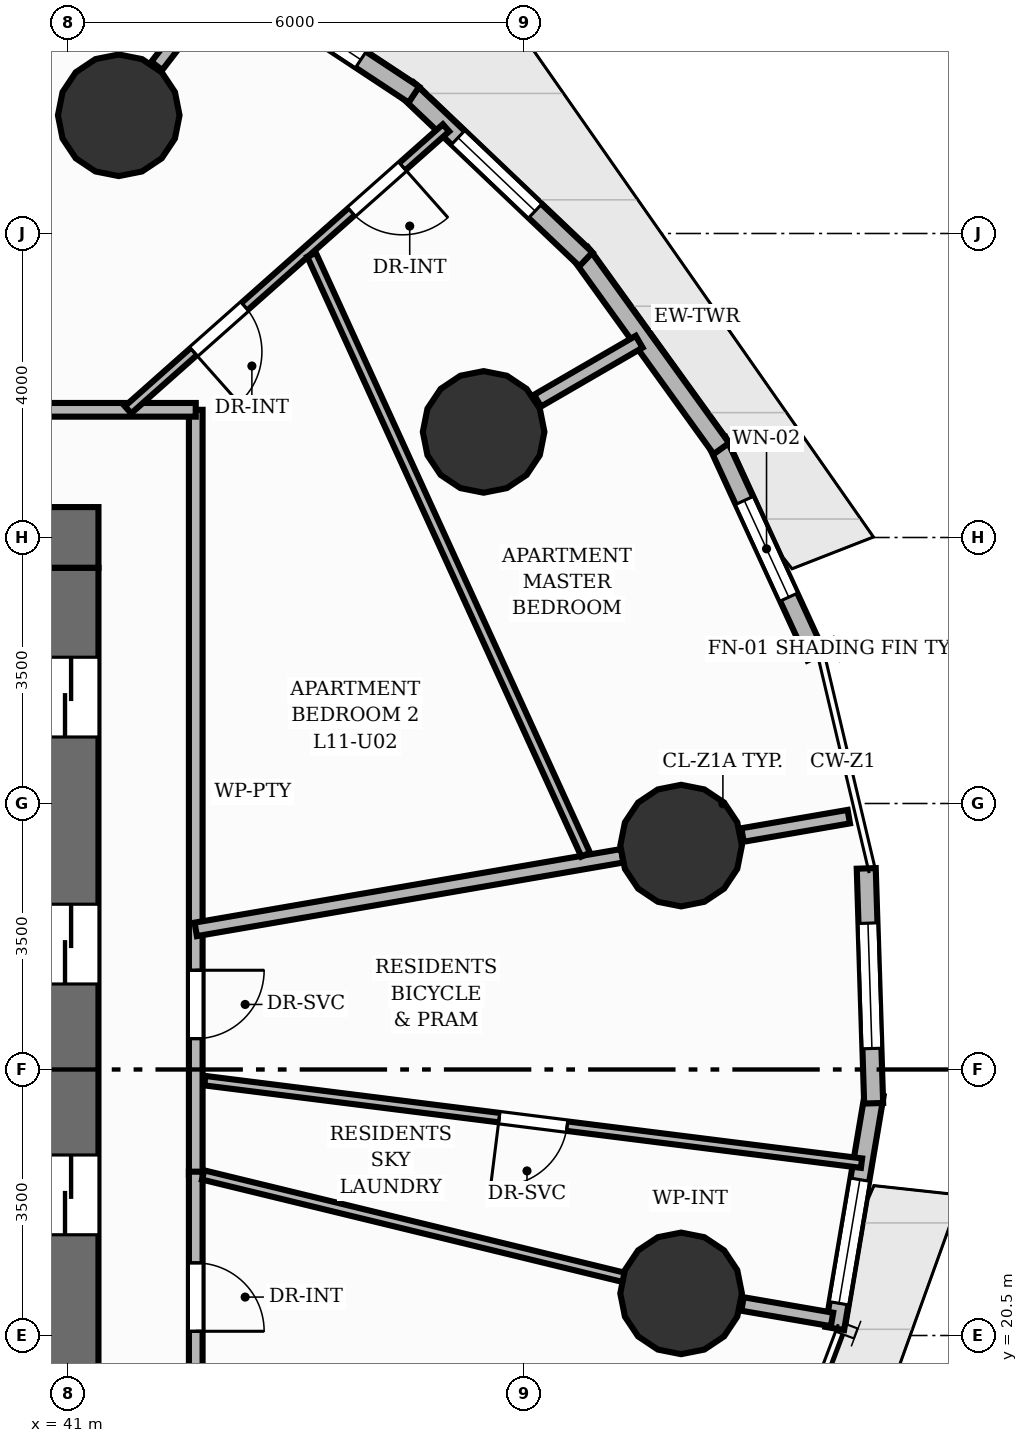
"""IFC4 building model, lengths in metres.
Left out: names, types, materials, properties, quantities, classifications, styles, units other than length and angle.
Written with IfcOpenShell. Run it as: python <this file> out.ifc"""

import sys

from ifc_helpers import new_model, si_unit, direction, frame, frame_2d, origin, origin_2d, place, context, subcontext, project, spatial, rectangle, circle, extrude, element, fill, save


model = new_model("IFC4")
c1 = context("Model", 3, precision=1e-05, world=origin(), true_north=direction((0.0, 1.0)))
c2 = subcontext(c1, "Body", "Model", "MODEL_VIEW")
j1 = project(units=[si_unit("LENGTHUNIT", "METRE"), si_unit("PLANEANGLEUNIT", "RADIAN")], contexts=[c1])
p1 = place(None, origin())
s1 = spatial("IfcSite", under=j1, at=p1, CompositionType="ELEMENT")
p2 = place(p1, origin())
s2 = spatial("IfcBuilding", under=s1, at=p2, CompositionType="ELEMENT")
p3 = place(p2, frame((0.0, 0.0, 40.8)))
s3 = spatial("IfcBuildingStorey", under=s2, at=p3, CompositionType="ELEMENT", Elevation=40.8)
p4 = place(p3, frame((22.6, 31.0, 0.0), z_axis=(0.0, 0.0, 1.0), x_axis=(1.0, 0.0, 0.0)))
e1 = element("IfcWall", 1, at=p4, inside=s3, PredefinedType="SHEAR", context=c2, shape_type="SweptSolid", body=[
    extrude(rectangle(XDim=18.8, YDim=0.8, at=frame_2d((9.4, 0.0))), origin(), (0.0, 0.0, 1.0), 3.2),
])
p5 = place(p4, frame((11.8, 0.0, 0.0)))
e2 = element("IfcOpeningElement", 2, at=p5, cuts=e1, PredefinedType="OPENING", context=c2, shape_type="SweptSolid", body=[
    extrude(rectangle(XDim=1.1, YDim=2.15, at=frame_2d((0.55, 1.075))), frame((0.0, 0.41, 0.0), z_axis=(0.0, -1.0, 0.0), x_axis=(1.0, 0.0, 0.0)), (0.0, 0.0, 1.0), 0.82),
])
p6 = place(p3, frame((41.0, 17.4, 0.0), z_axis=(0.0, 0.0, 1.0), x_axis=(0.0, 1.0, 0.0)))
e3 = element("IfcWall", 3, at=p6, inside=s3, PredefinedType="SHEAR", context=c2, shape_type="SweptSolid", body=[
    extrude(rectangle(XDim=13.2, YDim=0.8, at=frame_2d((6.6, 0.0))), origin(), (0.0, 0.0, 1.0), 3.2),
])
p7 = place(p6, frame((1.175, 0.0, 0.0)))
e4 = element("IfcOpeningElement", 4, at=p7, cuts=e3, PredefinedType="OPENING", context=c2, shape_type="SweptSolid", body=[
    extrude(rectangle(XDim=1.05, YDim=2.15, at=frame_2d((0.525, 1.075))), frame((0.0, 0.41, 0.0), z_axis=(0.0, -1.0, 0.0), x_axis=(1.0, 0.0, 0.0)), (0.0, 0.0, 1.0), 0.82),
])
p8 = place(p6, frame((4.425, 0.0, 0.0)))
e5 = element("IfcOpeningElement", 5, at=p8, cuts=e3, PredefinedType="OPENING", context=c2, shape_type="SweptSolid", body=[
    extrude(rectangle(XDim=1.05, YDim=2.15, at=frame_2d((0.525, 1.075))), frame((0.0, 0.41, 0.0), z_axis=(0.0, -1.0, 0.0), x_axis=(1.0, 0.0, 0.0)), (0.0, 0.0, 1.0), 0.82),
])
p9 = place(p6, frame((7.725, 0.0, 0.0)))
e6 = element("IfcOpeningElement", 6, at=p9, cuts=e3, PredefinedType="OPENING", context=c2, shape_type="SweptSolid", body=[
    extrude(rectangle(XDim=1.05, YDim=2.15, at=frame_2d((0.525, 1.075))), frame((0.0, 0.41, 0.0), z_axis=(0.0, -1.0, 0.0), x_axis=(1.0, 0.0, 0.0)), (0.0, 0.0, 1.0), 0.82),
])
p10 = place(p6, frame((10.975, 0.0, 0.0)))
e7 = element("IfcOpeningElement", 7, at=p10, cuts=e3, PredefinedType="OPENING", context=c2, shape_type="SweptSolid", body=[
    extrude(rectangle(XDim=1.05, YDim=2.15, at=frame_2d((0.525, 1.075))), frame((0.0, 0.41, 0.0), z_axis=(0.0, -1.0, 0.0), x_axis=(1.0, 0.0, 0.0)), (0.0, 0.0, 1.0), 0.82),
])
for number, where, z_axis, x_axis in (
    (8, (49.066, 26.946, 0.0), (0.0, 0.0, 1.0), (1.0, 0.0, 0.0)),
    (9, (46.468, 32.389, 0.0), (0.0, 0.0, 1.0), (1.0, 0.0, 0.0)),
    (10, (41.667, 36.555, 0.0), (0.0, 0.0, 1.0), (1.0, 0.0, 0.0)),
    (11, (49.066, 21.054, 0.0), (0.0, 0.0, 1.0), (1.0, 0.0, 0.0)),
):
    element("IfcColumn", number, at=place(p3, frame(where, z_axis=z_axis, x_axis=x_axis)), inside=s3, PredefinedType="COLUMN", context=c2, shape_type="SweptSolid", body=[
        extrude(circle(Radius=0.8, at=origin_2d()), origin(), (0.0, 0.0, 1.0), 3.2),
    ])
p11 = place(p3, frame((49.538, 32.268, 0.0), z_axis=(0.0, 0.0, 1.0), x_axis=(0.417872029175, -0.908505898293, 0.0)))
e12 = element("IfcWall", 12, at=p11, inside=s3, PredefinedType="SOLIDWALL", context=c2, shape_type="SweptSolid", body=[
    extrude(rectangle(XDim=3.12, YDim=0.25, at=frame_2d((1.56, 0.0))), origin(), (0.0, 0.0, 1.0), 2.96),
])
p12 = place(p11, frame((0.86, 0.0, 0.85)))
e13 = element("IfcOpeningElement", 13, at=p12, cuts=e12, PredefinedType="OPENING", context=c2, shape_type="SweptSolid", body=[
    extrude(rectangle(XDim=1.4, YDim=1.55, at=frame_2d((0.7, 0.775))), frame((0.0, 0.135, 0.0), z_axis=(0.0, -1.0, 0.0), x_axis=(1.0, 0.0, 0.0)), (0.0, 0.0, 1.0), 0.27),
])
p13 = place(p3, frame((47.739, 34.745, 0.0), z_axis=(0.0, 0.0, 1.0), x_axis=(0.584805106467, -0.811173833066, 0.0)))
e14 = element("IfcWall", 14, at=p13, inside=s3, PredefinedType="SOLIDWALL", context=c2, shape_type="SweptSolid", body=[
    extrude(rectangle(XDim=3.174, YDim=0.25, at=frame_2d((1.587, 0.0))), origin(), (0.0, 0.0, 1.0), 2.96),
])
p14 = place(p3, frame((45.462, 36.896, 0.0), z_axis=(0.0, 0.0, 1.0), x_axis=(0.724569059836, -0.689202203659, 0.0)))
e15 = element("IfcWall", 15, at=p14, inside=s3, PredefinedType="SOLIDWALL", context=c2, shape_type="SweptSolid", body=[
    extrude(rectangle(XDim=3.244, YDim=0.25, at=frame_2d((1.622, 0.0))), origin(), (0.0, 0.0, 1.0), 2.96),
])
p15 = place(p14, frame((0.922, 0.0, 0.85)))
e16 = element("IfcOpeningElement", 16, at=p15, cuts=e15, PredefinedType="OPENING", context=c2, shape_type="SweptSolid", body=[
    extrude(rectangle(XDim=1.4, YDim=1.55, at=frame_2d((0.7, 0.775))), frame((0.0, 0.135, 0.0), z_axis=(0.0, -1.0, 0.0), x_axis=(1.0, 0.0, 0.0)), (0.0, 0.0, 1.0), 0.27),
])
p16 = place(p3, frame((42.777, 38.656, 0.0), z_axis=(0.0, 0.0, 1.0), x_axis=(0.834663448541, -0.550760317805, 0.0)))
e17 = element("IfcWall", 17, at=p16, inside=s3, PredefinedType="SOLIDWALL", context=c2, shape_type="SweptSolid", body=[
    extrude(rectangle(XDim=3.323, YDim=0.25, at=frame_2d((1.661, 0.0))), origin(), (0.0, 0.0, 1.0), 2.96),
])
p17 = place(p16, frame((0.836, 0.0, 0.85)))
e18 = element("IfcOpeningElement", 18, at=p17, cuts=e17, PredefinedType="OPENING", context=c2, shape_type="SweptSolid", body=[
    extrude(rectangle(XDim=1.65, YDim=1.55, at=frame_2d((0.825, 0.775))), frame((0.0, 0.135, 0.0), z_axis=(0.0, -1.0, 0.0), x_axis=(1.0, 0.0, 0.0)), (0.0, 0.0, 1.0), 0.27),
])
p18 = place(p3, frame((51.607, 23.67, 0.0), z_axis=(0.0, 0.0, 1.0), x_axis=(-0.166403122634, -0.98605780803, 0.0)))
e19 = element("IfcWall", 19, at=p18, inside=s3, PredefinedType="SOLIDWALL", context=c2, shape_type="SweptSolid", body=[
    extrude(rectangle(XDim=3.121, YDim=0.25, at=frame_2d((1.56, 0.0))), origin(), (0.0, 0.0, 1.0), 2.96),
])
p19 = place(p18, frame((1.135, 0.0, 0.85)))
e20 = element("IfcOpeningElement", 20, at=p19, cuts=e19, PredefinedType="OPENING", context=c2, shape_type="SweptSolid", body=[
    extrude(rectangle(XDim=1.65, YDim=1.29, at=frame_2d((0.825, 0.645))), frame((0.0, 0.135, 0.0), z_axis=(0.0, -1.0, 0.0), x_axis=(1.0, 0.0, 0.0)), (0.0, 0.0, 1.0), 0.27),
])
p20 = place(p3, frame((51.501, 26.646, 0.0), z_axis=(0.0, 0.0, 1.0), x_axis=(0.031584802517, -0.999501075662, 0.0)))
e21 = element("IfcWall", 21, at=p20, inside=s3, PredefinedType="SOLIDWALL", context=c2, shape_type="SweptSolid", body=[
    extrude(rectangle(XDim=3.092, YDim=0.25, at=frame_2d((1.546, 0.0))), origin(), (0.0, 0.0, 1.0), 2.96),
])
p21 = place(p20, frame((0.721, 0.0, 0.85)))
e22 = element("IfcOpeningElement", 22, at=p21, cuts=e21, PredefinedType="OPENING", context=c2, shape_type="SweptSolid", body=[
    extrude(rectangle(XDim=1.65, YDim=1.55, at=frame_2d((0.825, 0.775))), frame((0.0, 0.135, 0.0), z_axis=(0.0, -1.0, 0.0), x_axis=(1.0, 0.0, 0.0)), (0.0, 0.0, 1.0), 0.27),
])
p22 = place(p3, frame((49.874, 27.085, 0.0), z_axis=(0.0, 0.0, 1.0), x_axis=(0.985419363098, 0.170143112797, 0.0)))
e23 = element("IfcWall", 23, at=p22, inside=s3, PredefinedType="PARTITIONING", context=c2, shape_type="SweptSolid", body=[
    extrude(rectangle(XDim=1.419, YDim=0.18, at=frame_2d((0.709, 0.0))), origin(), (0.0, 0.0, 1.0), 2.178),
])
p23 = place(p3, frame((47.177, 32.8, 0.0), z_axis=(0.0, 0.0, 1.0), x_axis=(0.865036673907, 0.501708633369, 0.0)))
e24 = element("IfcWall", 24, at=p23, inside=s3, PredefinedType="PARTITIONING", context=c2, shape_type="SweptSolid", body=[
    extrude(rectangle(XDim=1.545, YDim=0.18, at=frame_2d((0.773, 0.0))), origin(), (0.0, 0.0, 1.0), 2.178),
])
p24 = place(p3, frame((42.167, 37.205, 0.0), z_axis=(0.0, 0.0, 1.0), x_axis=(0.609978856004, 0.792417689876, 0.0)))
e25 = element("IfcWall", 25, at=p24, inside=s3, PredefinedType="PARTITIONING", context=c2, shape_type="SweptSolid", body=[
    extrude(rectangle(XDim=1.496, YDim=0.18, at=frame_2d((0.748, 0.0))), origin(), (0.0, 0.0, 1.0), 2.178),
])
p25 = place(p3, frame((49.874, 20.915, 0.0), z_axis=(0.0, 0.0, 1.0), x_axis=(0.98541644509, -0.170160012181, 0.0)))
e26 = element("IfcWall", 26, at=p25, inside=s3, PredefinedType="PARTITIONING", context=c2, shape_type="SweptSolid", body=[
    extrude(rectangle(XDim=1.195, YDim=0.18, at=frame_2d((0.598, 0.0))), origin(), (0.0, 0.0, 1.0), 2.178),
])
p26 = place(p3, frame((42.68, 32.68, 0.0), z_axis=(0.0, 0.0, 1.0), x_axis=(0.0, -1.0, 0.0)))
e27 = element("IfcWall", 27, at=p26, inside=s3, PredefinedType="PARTITIONING", context=c2, shape_type="SweptSolid", body=[
    extrude(rectangle(XDim=10.065, YDim=0.18, at=frame_2d((5.032, 0.0))), origin(), (0.0, 0.0, 1.0), 2.955),
])
p27 = place(p26, frame((7.374, 0.0, 0.0)))
e28 = element("IfcOpeningElement", 28, at=p27, cuts=e27, PredefinedType="OPENING", context=c2, shape_type="SweptSolid", body=[
    extrude(rectangle(XDim=0.9, YDim=2.1, at=frame_2d((0.45, 1.05))), frame((0.0, 0.1, 0.0), z_axis=(0.0, -1.0, 0.0), x_axis=(1.0, 0.0, 0.0)), (0.0, 0.0, 1.0), 0.2),
])
p28 = place(p3, frame((42.68, 22.656, 0.0), z_axis=(0.0, 0.0, 1.0), x_axis=(0.0, -1.0, 0.0)))
e29 = element("IfcWall", 29, at=p28, inside=s3, PredefinedType="PARTITIONING", context=c2, shape_type="SweptSolid", body=[
    extrude(rectangle(XDim=7.335, YDim=0.18, at=frame_2d((3.668, 0.0))), origin(), (0.0, 0.0, 1.0), 2.955),
])
p29 = place(p28, frame((1.2, 0.0, 0.0)))
e30 = element("IfcOpeningElement", 30, at=p29, cuts=e29, PredefinedType="OPENING", context=c2, shape_type="SweptSolid", body=[
    extrude(rectangle(XDim=0.9, YDim=2.1, at=frame_2d((0.45, 1.05))), frame((0.0, 0.1, 0.0), z_axis=(0.0, -1.0, 0.0), x_axis=(1.0, 0.0, 0.0)), (0.0, 0.0, 1.0), 0.2),
])
p30 = place(p28, frame((4.846, 0.0, 0.0)))
e31 = element("IfcOpeningElement", 31, at=p30, cuts=e29, PredefinedType="OPENING", context=c2, shape_type="SweptSolid", body=[
    extrude(rectangle(XDim=0.9, YDim=2.1, at=frame_2d((0.45, 1.05))), frame((0.0, 0.1, 0.0), z_axis=(0.0, -1.0, 0.0), x_axis=(1.0, 0.0, 0.0)), (0.0, 0.0, 1.0), 0.2),
])
p31 = place(p3, frame((21.32, 32.68, 0.0), z_axis=(0.0, 0.0, 1.0), x_axis=(1.0, 0.0, 0.0)))
e32 = element("IfcWall", 32, at=p31, inside=s3, PredefinedType="PARTITIONING", context=c2, shape_type="SweptSolid", body=[
    extrude(rectangle(XDim=21.36, YDim=0.18, at=frame_2d((10.68, 0.0))), origin(), (0.0, 0.0, 1.0), 2.955),
])
p32 = place(p31, frame((17.013, 0.0, 0.0)))
e33 = element("IfcOpeningElement", 33, at=p32, cuts=e32, PredefinedType="OPENING", context=c2, shape_type="SweptSolid", body=[
    extrude(rectangle(XDim=1.05, YDim=2.15, at=frame_2d((0.525, 1.075))), frame((0.0, 0.1, 0.0), z_axis=(0.0, -1.0, 0.0), x_axis=(1.0, 0.0, 0.0)), (0.0, 0.0, 1.0), 0.2),
])
p33 = place(p31, frame((5.82, 0.0, 0.0)))
e34 = element("IfcOpeningElement", 34, at=p33, cuts=e32, PredefinedType="OPENING", context=c2, shape_type="SweptSolid", body=[
    extrude(rectangle(XDim=1.05, YDim=2.15, at=frame_2d((0.525, 1.075))), frame((0.0, 0.1, 0.0), z_axis=(0.0, -1.0, 0.0), x_axis=(1.0, 0.0, 0.0)), (0.0, 0.0, 1.0), 0.2),
])
p34 = place(p3, frame((51.439, 22.768, 0.0), z_axis=(0.0, 0.0, 1.0), x_axis=(-0.992204813033, 0.124617851825, 0.0)))
e35 = element("IfcWall", 35, at=p34, inside=s3, PredefinedType="PARTITIONING", context=c2, shape_type="SweptSolid", body=[
    extrude(rectangle(XDim=8.708, YDim=0.125, at=frame_2d((4.354, 0.0))), origin(), (0.0, 0.0, 1.0), 2.641),
])
p35 = place(p34, frame((3.904, 0.0, 0.0)))
e36 = element("IfcOpeningElement", 36, at=p35, cuts=e35, PredefinedType="OPENING", context=c2, shape_type="SweptSolid", body=[
    extrude(rectangle(XDim=0.9, YDim=2.1, at=frame_2d((0.45, 1.05))), frame((0.0, 0.073, 0.0), z_axis=(0.0, -1.0, 0.0), x_axis=(1.0, 0.0, 0.0)), (0.0, 0.0, 1.0), 0.145),
])
p36 = place(p3, frame((42.68, 25.844, 0.0), z_axis=(0.0, 0.0, 1.0), x_axis=(0.98542122422, 0.170132333364, 0.0)))
e37 = element("IfcWall", 37, at=p36, inside=s3, PredefinedType="PARTITIONING", context=c2, shape_type="SweptSolid", body=[
    extrude(rectangle(XDim=5.694, YDim=0.18, at=frame_2d((2.847, 0.0))), origin(), (0.0, 0.0, 1.0), 2.178),
])
p37 = place(p3, frame((42.777, 22.612, 0.0), z_axis=(0.0, 0.0, 1.0), x_axis=(0.971633604644, -0.236491307083, 0.0)))
e38 = element("IfcWall", 38, at=p37, inside=s3, PredefinedType="PARTITIONING", context=c2, shape_type="SweptSolid", body=[
    extrude(rectangle(XDim=5.707, YDim=0.125, at=frame_2d((2.854, 0.0))), origin(), (0.0, 0.0, 1.0), 2.178),
])
p38 = place(p3, frame((45.973, 36.39, 0.0), z_axis=(0.0, 0.0, 1.0), x_axis=(-0.748208515509, -0.663463651845, 0.0)))
e39 = element("IfcWall", 39, at=p38, inside=s3, PredefinedType="PARTITIONING", context=c2, shape_type="SweptSolid", body=[
    extrude(rectangle(XDim=5.592, YDim=0.125, at=frame_2d((2.796, 0.0))), origin(), (0.0, 0.0, 1.0), 2.955),
])
p39 = place(p38, frame((0.765, 0.0, 0.0)))
e40 = element("IfcOpeningElement", 40, at=p39, cuts=e39, PredefinedType="OPENING", context=c2, shape_type="SweptSolid", body=[
    extrude(rectangle(XDim=0.9, YDim=2.1, at=frame_2d((0.45, 1.05))), frame((0.0, 0.073, 0.0), z_axis=(0.0, -1.0, 0.0), x_axis=(1.0, 0.0, 0.0)), (0.0, 0.0, 1.0), 0.145),
])
p40 = place(p38, frame((3.54, 0.0, 0.0)))
e41 = element("IfcOpeningElement", 41, at=p40, cuts=e39, PredefinedType="OPENING", context=c2, shape_type="SweptSolid", body=[
    extrude(rectangle(XDim=0.9, YDim=2.1, at=frame_2d((0.45, 1.05))), frame((0.0, 0.073, 0.0), z_axis=(0.0, -1.0, 0.0), x_axis=(1.0, 0.0, 0.0)), (0.0, 0.0, 1.0), 0.145),
])
p41 = place(p3, frame((47.81, 26.827, 0.0), z_axis=(0.0, 0.0, 1.0), x_axis=(-0.41559351113, 0.909550456823, 0.0)))
e42 = element("IfcWall", 42, at=p41, inside=s3, PredefinedType="PARTITIONING", context=c2, shape_type="SweptSolid", body=[
    extrude(rectangle(XDim=8.677, YDim=0.125, at=frame_2d((4.338, 0.0))), origin(), (0.0, 0.0, 1.0), 2.328),
])
p42 = place(p12, origin())
e43 = element("IfcWindow", 43, at=p42, inside=s3, PartitioningType="SINGLE_PANEL", PredefinedType="WINDOW", context=c2, shape_type="SweptSolid", body=[
    extrude(rectangle(XDim=1.4, YDim=1.55, at=frame_2d((0.7, 0.775))), frame((0.0, 0.03, 0.0), z_axis=(0.0, -1.0, 0.0), x_axis=(1.0, 0.0, 0.0)), (0.0, 0.0, 1.0), 0.06),
])
fill(e13, e43)
p43 = place(p15, origin())
e44 = element("IfcWindow", 44, at=p43, inside=s3, PartitioningType="SINGLE_PANEL", PredefinedType="WINDOW", context=c2, shape_type="SweptSolid", body=[
    extrude(rectangle(XDim=1.4, YDim=1.55, at=frame_2d((0.7, 0.775))), frame((0.0, 0.03, 0.0), z_axis=(0.0, -1.0, 0.0), x_axis=(1.0, 0.0, 0.0)), (0.0, 0.0, 1.0), 0.06),
])
fill(e16, e44)
p44 = place(p17, origin())
e45 = element("IfcWindow", 45, at=p44, inside=s3, PartitioningType="SINGLE_PANEL", PredefinedType="WINDOW", context=c2, shape_type="SweptSolid", body=[
    extrude(rectangle(XDim=1.65, YDim=1.55, at=frame_2d((0.825, 0.775))), frame((0.0, 0.03, 0.0), z_axis=(0.0, -1.0, 0.0), x_axis=(1.0, 0.0, 0.0)), (0.0, 0.0, 1.0), 0.06),
])
fill(e18, e45)
p45 = place(p19, origin())
e46 = element("IfcWindow", 46, at=p45, inside=s3, PartitioningType="SINGLE_PANEL", PredefinedType="WINDOW", context=c2, shape_type="SweptSolid", body=[
    extrude(rectangle(XDim=1.65, YDim=1.29, at=frame_2d((0.825, 0.645))), frame((0.0, 0.03, 0.0), z_axis=(0.0, -1.0, 0.0), x_axis=(1.0, 0.0, 0.0)), (0.0, 0.0, 1.0), 0.06),
])
fill(e20, e46)
p46 = place(p21, origin())
e47 = element("IfcWindow", 47, at=p46, inside=s3, PartitioningType="SINGLE_PANEL", PredefinedType="WINDOW", context=c2, shape_type="SweptSolid", body=[
    extrude(rectangle(XDim=1.65, YDim=1.55, at=frame_2d((0.825, 0.775))), frame((0.0, 0.03, 0.0), z_axis=(0.0, -1.0, 0.0), x_axis=(1.0, 0.0, 0.0)), (0.0, 0.0, 1.0), 0.06),
])
fill(e22, e47)
p47 = place(p8, origin())
e48 = element("IfcDoor", 48, at=p47, inside=s3, OperationType="DOUBLE_DOOR_SLIDING", PredefinedType="DOOR", context=c2, shape_type="SweptSolid", body=[
    extrude(rectangle(XDim=1.05, YDim=2.15, at=frame_2d((0.525, 1.075))), frame((0.0, 0.025, 0.0), z_axis=(0.0, -1.0, 0.0), x_axis=(1.0, 0.0, 0.0)), (0.0, 0.0, 1.0), 0.05),
])
fill(e5, e48)
p48 = place(p9, origin())
e49 = element("IfcDoor", 49, at=p48, inside=s3, OperationType="DOUBLE_DOOR_SLIDING", PredefinedType="DOOR", context=c2, shape_type="SweptSolid", body=[
    extrude(rectangle(XDim=1.05, YDim=2.15, at=frame_2d((0.525, 1.075))), frame((0.0, 0.025, 0.0), z_axis=(0.0, -1.0, 0.0), x_axis=(1.0, 0.0, 0.0)), (0.0, 0.0, 1.0), 0.05),
])
fill(e6, e49)
p49 = place(p10, origin())
e50 = element("IfcDoor", 50, at=p49, inside=s3, OperationType="DOUBLE_DOOR_SLIDING", PredefinedType="DOOR", context=c2, shape_type="SweptSolid", body=[
    extrude(rectangle(XDim=1.05, YDim=2.15, at=frame_2d((0.525, 1.075))), frame((0.0, 0.025, 0.0), z_axis=(0.0, -1.0, 0.0), x_axis=(1.0, 0.0, 0.0)), (0.0, 0.0, 1.0), 0.05),
])
fill(e7, e50)
p50 = place(p27, origin())
e51 = element("IfcDoor", 51, at=p50, inside=s3, OperationType="SINGLE_SWING_LEFT", PredefinedType="DOOR", context=c2, shape_type="SweptSolid", body=[
    extrude(rectangle(XDim=0.9, YDim=2.1, at=frame_2d((0.45, 1.05))), frame((0.0, 0.025, 0.0), z_axis=(0.0, -1.0, 0.0), x_axis=(1.0, 0.0, 0.0)), (0.0, 0.0, 1.0), 0.05),
])
fill(e28, e51)
p51 = place(p29, origin())
e52 = element("IfcDoor", 52, at=p51, inside=s3, OperationType="SINGLE_SWING_RIGHT", PredefinedType="DOOR", context=c2, shape_type="SweptSolid", body=[
    extrude(rectangle(XDim=0.9, YDim=2.1, at=frame_2d((0.45, 1.05))), frame((0.0, 0.025, 0.0), z_axis=(0.0, -1.0, 0.0), x_axis=(1.0, 0.0, 0.0)), (0.0, 0.0, 1.0), 0.05),
])
fill(e30, e52)
p52 = place(p35, origin())
e53 = element("IfcDoor", 53, at=p52, inside=s3, OperationType="SINGLE_SWING_RIGHT", PredefinedType="DOOR", context=c2, shape_type="SweptSolid", body=[
    extrude(rectangle(XDim=0.9, YDim=2.1, at=frame_2d((0.45, 1.05))), frame((0.0, 0.025, 0.0), z_axis=(0.0, -1.0, 0.0), x_axis=(1.0, 0.0, 0.0)), (0.0, 0.0, 1.0), 0.05),
])
fill(e36, e53)
p53 = place(p39, origin())
e54 = element("IfcDoor", 54, at=p53, inside=s3, OperationType="SINGLE_SWING_LEFT", PredefinedType="DOOR", context=c2, shape_type="SweptSolid", body=[
    extrude(rectangle(XDim=0.9, YDim=2.1, at=frame_2d((0.45, 1.05))), frame((0.0, 0.025, 0.0), z_axis=(0.0, -1.0, 0.0), x_axis=(1.0, 0.0, 0.0)), (0.0, 0.0, 1.0), 0.05),
])
fill(e40, e54)
p54 = place(p40, origin())
e55 = element("IfcDoor", 55, at=p54, inside=s3, OperationType="SINGLE_SWING_RIGHT", PredefinedType="DOOR", context=c2, shape_type="SweptSolid", body=[
    extrude(rectangle(XDim=0.9, YDim=2.1, at=frame_2d((0.45, 1.05))), frame((0.0, 0.025, 0.0), z_axis=(0.0, -1.0, 0.0), x_axis=(1.0, 0.0, 0.0)), (0.0, 0.0, 1.0), 0.05),
])
fill(e41, e55)
save(model, sys.argv[1])
